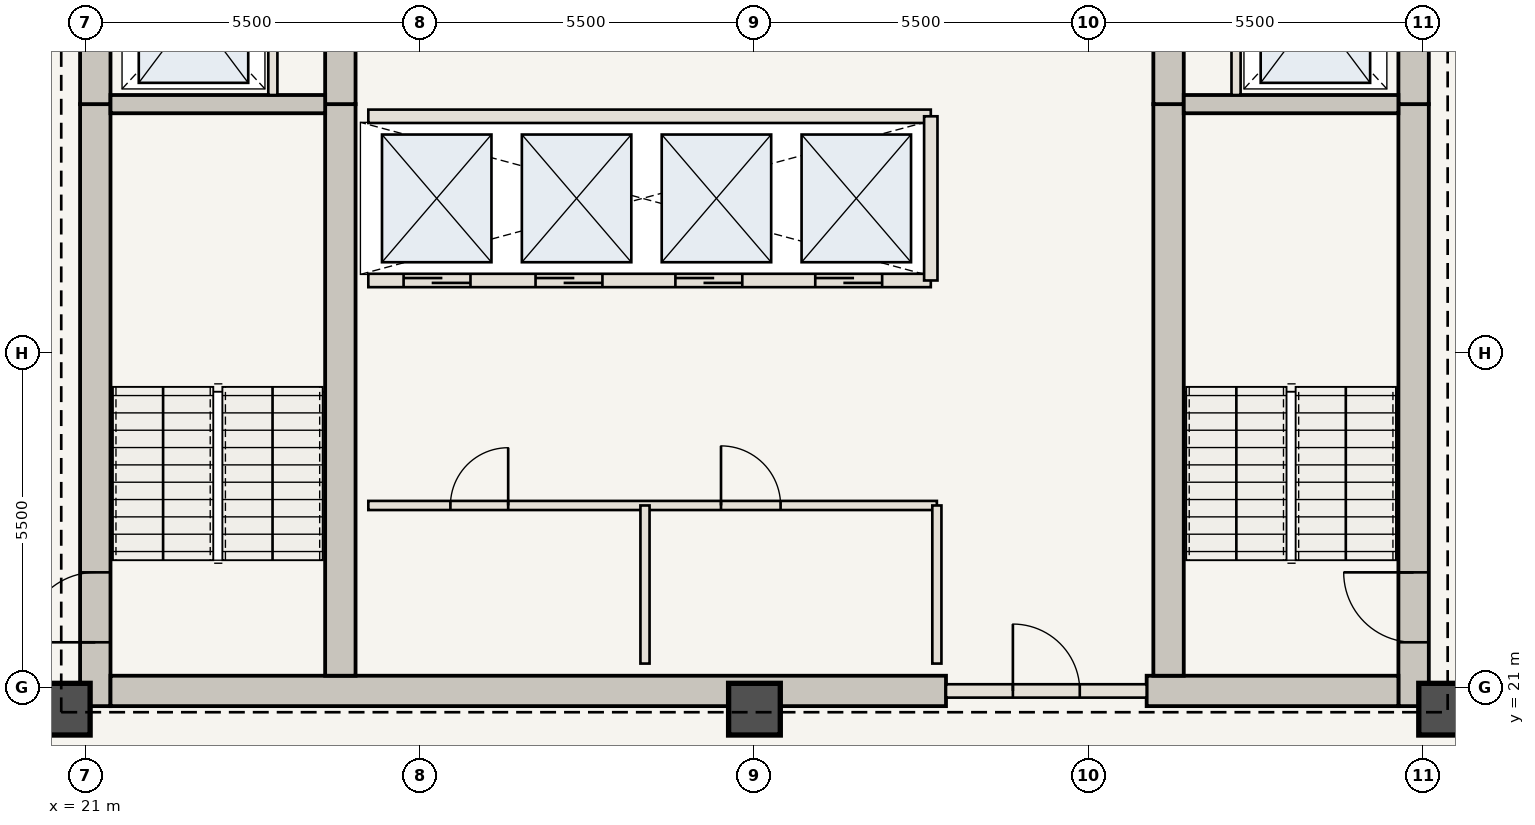
"""IFC4 building model, lengths in metres.
Left out: names, types, materials, properties, quantities, classifications, styles, units other than length and angle.
Written with IfcOpenShell. Run it as: python <this file> out.ifc"""

import sys

from ifc_helpers import new_model, si_unit, direction, frame, frame_2d, origin, origin_2d, place, context, subcontext, project, spatial, rectangle, extrude, element, fill, save


model = new_model("IFC4")
c1 = context("Model", 3, precision=1e-05, world=origin(), true_north=direction((0.0, 1.0)))
c2 = subcontext(c1, "Body", "Model", "MODEL_VIEW")
j1 = project(units=[si_unit("LENGTHUNIT", "METRE"), si_unit("PLANEANGLEUNIT", "RADIAN")], contexts=[c1])
p1 = place(None, origin())
s1 = spatial("IfcSite", under=j1, at=p1, CompositionType="ELEMENT")
p2 = place(p1, origin())
s2 = spatial("IfcBuilding", under=s1, at=p2, CompositionType="ELEMENT")
p3 = place(p2, frame((0.0, 0.0, 186.9)))
s3 = spatial("IfcBuildingStorey", under=s2, at=p3, CompositionType="ELEMENT", Elevation=186.9)
p4 = place(p3, frame((21.16, 20.7, 0.0), z_axis=(0.0, 0.0, 1.0), x_axis=(0.0, 1.0, 0.0)))
e1 = element("IfcWall", 1, at=p4, inside=s3, PredefinedType="SHEAR", context=c2, shape_type="SweptSolid", body=[
    extrude(rectangle(XDim=9.9, YDim=0.5, at=frame_2d((4.95, 0.0))), origin(), (0.0, 0.0, 1.0), 3.85),
])
p5 = place(p4, frame((1.05, 0.0, 0.0)))
e2 = element("IfcOpeningElement", 2, at=p5, cuts=e1, PredefinedType="OPENING", context=c2, shape_type="SweptSolid", body=[
    extrude(rectangle(XDim=1.15, YDim=2.15, at=frame_2d((0.575, 1.075))), frame((0.0, 0.26, 0.0), z_axis=(0.0, -1.0, 0.0), x_axis=(1.0, 0.0, 0.0)), (0.0, 0.0, 1.0), 0.52),
])
p6 = place(p3, frame((21.16, 30.6, 0.0), z_axis=(0.0, 0.0, 1.0), x_axis=(0.0, 1.0, 0.0)))
e3 = element("IfcWall", 3, at=p6, inside=s3, PredefinedType="SHEAR", context=c2, shape_type="SweptSolid", body=[
    extrude(rectangle(XDim=12.65, YDim=0.5, at=frame_2d((6.325, 0.0))), origin(), (0.0, 0.0, 1.0), 3.85),
])
p7 = place(p6, frame((4.2, 0.0, 0.0)))
e4 = element("IfcOpeningElement", 4, at=p7, cuts=e3, PredefinedType="OPENING", context=c2, shape_type="SweptSolid", body=[
    extrude(rectangle(XDim=1.1, YDim=2.15, at=frame_2d((0.55, 1.075))), frame((0.0, 0.26, 0.0), z_axis=(0.0, -1.0, 0.0), x_axis=(1.0, 0.0, 0.0)), (0.0, 0.0, 1.0), 0.52),
])
p8 = place(p6, frame((9.2, 0.0, 0.0)))
e5 = element("IfcOpeningElement", 5, at=p8, cuts=e3, PredefinedType="OPENING", context=c2, shape_type="SweptSolid", body=[
    extrude(rectangle(XDim=0.92, YDim=2.1, at=frame_2d((0.46, 1.05))), frame((0.0, 0.26, 0.0), z_axis=(0.0, -1.0, 0.0), x_axis=(1.0, 0.0, 0.0)), (0.0, 0.0, 1.0), 0.52),
])
p9 = place(p3, frame((42.84, 20.7, 0.0), z_axis=(0.0, 0.0, 1.0), x_axis=(0.0, 1.0, 0.0)))
e6 = element("IfcWall", 6, at=p9, inside=s3, PredefinedType="SHEAR", context=c2, shape_type="SweptSolid", body=[
    extrude(rectangle(XDim=9.9, YDim=0.5, at=frame_2d((4.95, 0.0))), origin(), (0.0, 0.0, 1.0), 3.85),
])
p10 = place(p9, frame((1.05, 0.0, 0.0)))
e7 = element("IfcOpeningElement", 7, at=p10, cuts=e6, PredefinedType="OPENING", context=c2, shape_type="SweptSolid", body=[
    extrude(rectangle(XDim=1.15, YDim=2.15, at=frame_2d((0.575, 1.075))), frame((0.0, 0.26, 0.0), z_axis=(0.0, -1.0, 0.0), x_axis=(1.0, 0.0, 0.0)), (0.0, 0.0, 1.0), 0.52),
])
p11 = place(p3, frame((42.84, 30.6, 0.0), z_axis=(0.0, 0.0, 1.0), x_axis=(0.0, 1.0, 0.0)))
e8 = element("IfcWall", 8, at=p11, inside=s3, PredefinedType="SHEAR", context=c2, shape_type="SweptSolid", body=[
    extrude(rectangle(XDim=12.65, YDim=0.5, at=frame_2d((6.325, 0.0))), origin(), (0.0, 0.0, 1.0), 3.85),
])
p12 = place(p11, frame((4.2, 0.0, 0.0)))
e9 = element("IfcOpeningElement", 9, at=p12, cuts=e8, PredefinedType="OPENING", context=c2, shape_type="SweptSolid", body=[
    extrude(rectangle(XDim=1.1, YDim=2.15, at=frame_2d((0.55, 1.075))), frame((0.0, 0.26, 0.0), z_axis=(0.0, -1.0, 0.0), x_axis=(1.0, 0.0, 0.0)), (0.0, 0.0, 1.0), 0.52),
])
p13 = place(p11, frame((8.4, 0.0, 0.0)))
e10 = element("IfcOpeningElement", 10, at=p13, cuts=e8, PredefinedType="OPENING", context=c2, shape_type="SweptSolid", body=[
    extrude(rectangle(XDim=0.88, YDim=2.1, at=frame_2d((0.44, 1.05))), frame((0.0, 0.26, 0.0), z_axis=(0.0, -1.0, 0.0), x_axis=(1.0, 0.0, 0.0)), (0.0, 0.0, 1.0), 0.52),
])
p14 = place(p11, frame((10.5, 0.0, 0.0)))
e11 = element("IfcOpeningElement", 11, at=p14, cuts=e8, PredefinedType="OPENING", context=c2, shape_type="SweptSolid", body=[
    extrude(rectangle(XDim=0.88, YDim=2.1, at=frame_2d((0.44, 1.05))), frame((0.0, 0.26, 0.0), z_axis=(0.0, -1.0, 0.0), x_axis=(1.0, 0.0, 0.0)), (0.0, 0.0, 1.0), 0.52),
])
p15 = place(p3, frame((21.41, 20.95, 0.0), z_axis=(0.0, 0.0, 1.0), x_axis=(1.0, 0.0, 0.0)))
e12 = element("IfcWall", 12, at=p15, inside=s3, PredefinedType="SHEAR", context=c2, shape_type="SweptSolid", body=[
    extrude(rectangle(XDim=13.74, YDim=0.5, at=frame_2d((6.87, 0.0))), origin(), (0.0, 0.0, 1.0), 3.85),
])
p16 = place(p3, frame((38.45, 20.95, 0.0), z_axis=(0.0, 0.0, 1.0), x_axis=(1.0, 0.0, 0.0)))
e13 = element("IfcWall", 13, at=p16, inside=s3, PredefinedType="SHEAR", context=c2, shape_type="SweptSolid", body=[
    extrude(rectangle(XDim=4.14, YDim=0.5, at=frame_2d((2.07, 0.0))), origin(), (0.0, 0.0, 1.0), 3.85),
])
p17 = place(p3, frame((25.19, 21.2, 0.0), z_axis=(0.0, 0.0, 1.0), x_axis=(0.0, 1.0, 0.0)))
e14 = element("IfcWall", 14, at=p17, inside=s3, PredefinedType="SHEAR", context=c2, shape_type="SweptSolid", body=[
    extrude(rectangle(XDim=9.4, YDim=0.5, at=frame_2d((4.7, 0.0))), origin(), (0.0, 0.0, 1.0), 3.85),
])
p18 = place(p3, frame((25.19, 30.6, 0.0), z_axis=(0.0, 0.0, 1.0), x_axis=(0.0, 1.0, 0.0)))
e15 = element("IfcWall", 15, at=p18, inside=s3, PredefinedType="SHEAR", context=c2, shape_type="SweptSolid", body=[
    extrude(rectangle(XDim=12.15, YDim=0.5, at=frame_2d((6.075, 0.0))), origin(), (0.0, 0.0, 1.0), 3.85),
])
p19 = place(p18, frame((6.25, 0.0, 0.0)))
e16 = element("IfcOpeningElement", 16, at=p19, cuts=e15, PredefinedType="OPENING", context=c2, shape_type="SweptSolid", body=[
    extrude(rectangle(XDim=1.1, YDim=2.15, at=frame_2d((0.55, 1.075))), frame((0.0, 0.26, 0.0), z_axis=(0.0, -1.0, 0.0), x_axis=(1.0, 0.0, 0.0)), (0.0, 0.0, 1.0), 0.52),
])
p20 = place(p3, frame((38.81, 21.2, 0.0), z_axis=(0.0, 0.0, 1.0), x_axis=(0.0, 1.0, 0.0)))
e17 = element("IfcWall", 17, at=p20, inside=s3, PredefinedType="SHEAR", context=c2, shape_type="SweptSolid", body=[
    extrude(rectangle(XDim=9.4, YDim=0.5, at=frame_2d((4.7, 0.0))), origin(), (0.0, 0.0, 1.0), 3.85),
])
p21 = place(p3, frame((38.81, 30.6, 0.0), z_axis=(0.0, 0.0, 1.0), x_axis=(0.0, 1.0, 0.0)))
e18 = element("IfcWall", 18, at=p21, inside=s3, PredefinedType="SHEAR", context=c2, shape_type="SweptSolid", body=[
    extrude(rectangle(XDim=12.15, YDim=0.5, at=frame_2d((6.075, 0.0))), origin(), (0.0, 0.0, 1.0), 3.85),
])
for number, where, z_axis, x_axis in (
    (19, (20.65, 20.65, 0.0), (0.0, 0.0, 1.0), (1.0, 0.0, 0.0)),
    (20, (32.0, 20.65, 0.0), (0.0, 0.0, 1.0), (1.0, 0.0, 0.0)),
    (21, (43.35, 20.65, 0.0), (0.0, 0.0, 1.0), (1.0, 0.0, 0.0)),
):
    element("IfcColumn", number, at=place(p3, frame(where, z_axis=z_axis, x_axis=x_axis)), inside=s3, PredefinedType="COLUMN", context=c2, shape_type="SweptSolid", body=[
        extrude(rectangle(XDim=0.85, YDim=0.85, at=origin_2d()), origin(), (0.0, 0.0, 1.0), 3.85),
    ])
for number, where, z_axis, x_axis in (
    (22, (21.41, 30.6, 0.0), (0.0, 0.0, 1.0), (1.0, 0.0, 0.0)),
    (23, (39.06, 30.6, 0.0), (0.0, 0.0, 1.0), (1.0, 0.0, 0.0)),
):
    element("IfcWall", number, at=place(p3, frame(where, z_axis=z_axis, x_axis=x_axis)), inside=s3, PredefinedType="SHEAR", context=c2, shape_type="SweptSolid", body=[
        extrude(rectangle(XDim=3.53, YDim=0.3, at=frame_2d((1.765, 0.0))), origin(), (0.0, 0.0, 1.0), 3.43),
    ])
for number, where, z_axis, x_axis in (
    (24, (24.08, 30.75, 0.0), (0.0, 0.0, 1.0), (0.0, 1.0, 0.0)),
    (25, (39.92, 30.75, 0.0), (0.0, 0.0, 1.0), (0.0, 1.0, 0.0)),
):
    element("IfcWall", number, at=place(p3, frame(where, z_axis=z_axis, x_axis=x_axis)), inside=s3, PredefinedType="STANDARD", context=c2, shape_type="SweptSolid", body=[
        extrude(rectangle(XDim=2.65, YDim=0.15, at=frame_2d((1.325, 0.0))), origin(), (0.0, 0.0, 1.0), 3.43),
    ])
p22 = place(p3, frame((35.15, 20.95, 0.0), z_axis=(0.0, 0.0, 1.0), x_axis=(1.0, 0.0, 0.0)))
e26 = element("IfcWall", 26, at=p22, inside=s3, PredefinedType="STANDARD", context=c2, shape_type="SweptSolid", body=[
    extrude(rectangle(XDim=3.3, YDim=0.22, at=frame_2d((1.65, 0.0))), origin(), (0.0, 0.0, 1.0), 3.43),
])
p23 = place(p22, frame((1.1, 0.0, 0.0)))
e27 = element("IfcOpeningElement", 27, at=p23, cuts=e26, PredefinedType="OPENING", context=c2, shape_type="SweptSolid", body=[
    extrude(rectangle(XDim=1.1, YDim=2.15, at=frame_2d((0.55, 1.075))), frame((0.0, 0.12, 0.0), z_axis=(0.0, -1.0, 0.0), x_axis=(1.0, 0.0, 0.0)), (0.0, 0.0, 1.0), 0.24),
])
p24 = place(p3, frame((25.65, 24.0, 0.0), z_axis=(0.0, 0.0, 1.0), x_axis=(1.0, 0.0, 0.0)))
e28 = element("IfcWall", 28, at=p24, inside=s3, PredefinedType="STANDARD", context=c2, shape_type="SweptSolid", body=[
    extrude(rectangle(XDim=9.35, YDim=0.15, at=frame_2d((4.675, 0.0))), origin(), (0.0, 0.0, 1.0), 3.43),
])
p25 = place(p24, frame((1.35, 0.0, 0.0)))
e29 = element("IfcOpeningElement", 29, at=p25, cuts=e28, PredefinedType="OPENING", context=c2, shape_type="SweptSolid", body=[
    extrude(rectangle(XDim=0.95, YDim=2.15, at=frame_2d((0.475, 1.075))), frame((0.0, 0.085, 0.0), z_axis=(0.0, -1.0, 0.0), x_axis=(1.0, 0.0, 0.0)), (0.0, 0.0, 1.0), 0.17),
])
p26 = place(p24, frame((5.8, 0.0, 0.0)))
e30 = element("IfcOpeningElement", 30, at=p26, cuts=e28, PredefinedType="OPENING", context=c2, shape_type="SweptSolid", body=[
    extrude(rectangle(XDim=0.98, YDim=2.2, at=frame_2d((0.49, 1.1))), frame((0.0, 0.085, 0.0), z_axis=(0.0, -1.0, 0.0), x_axis=(1.0, 0.0, 0.0)), (0.0, 0.0, 1.0), 0.17),
])
for number, where, z_axis, x_axis in (
    (31, (30.2, 21.4, 0.0), (0.0, 0.0, 1.0), (0.0, 1.0, 0.0)),
    (32, (35.0, 21.4, 0.0), (0.0, 0.0, 1.0), (0.0, 1.0, 0.0)),
):
    element("IfcWall", number, at=place(p3, frame(where, z_axis=z_axis, x_axis=x_axis)), inside=s3, PredefinedType="STANDARD", context=c2, shape_type="SweptSolid", body=[
        extrude(rectangle(XDim=2.6, YDim=0.15, at=frame_2d((1.3, 0.0))), origin(), (0.0, 0.0, 1.0), 3.43),
    ])
p27 = place(p3, frame((25.65, 27.7, 0.0), z_axis=(0.0, 0.0, 1.0), x_axis=(1.0, 0.0, 0.0)))
e33 = element("IfcWall", 33, at=p27, inside=s3, PredefinedType="STANDARD", context=c2, shape_type="SweptSolid", body=[
    extrude(rectangle(XDim=9.25, YDim=0.22, at=frame_2d((4.625, 0.0))), origin(), (0.0, 0.0, 1.0), 3.43),
])
p28 = place(p27, frame((0.58, 0.0, 0.0)))
e34 = element("IfcOpeningElement", 34, at=p28, cuts=e33, PredefinedType="OPENING", context=c2, shape_type="SweptSolid", body=[
    extrude(rectangle(XDim=1.1, YDim=2.15, at=frame_2d((0.55, 1.075))), frame((0.0, 0.12, 0.0), z_axis=(0.0, -1.0, 0.0), x_axis=(1.0, 0.0, 0.0)), (0.0, 0.0, 1.0), 0.24),
])
p29 = place(p27, frame((2.75, 0.0, 0.0)))
e35 = element("IfcOpeningElement", 35, at=p29, cuts=e33, PredefinedType="OPENING", context=c2, shape_type="SweptSolid", body=[
    extrude(rectangle(XDim=1.1, YDim=2.15, at=frame_2d((0.55, 1.075))), frame((0.0, 0.12, 0.0), z_axis=(0.0, -1.0, 0.0), x_axis=(1.0, 0.0, 0.0)), (0.0, 0.0, 1.0), 0.24),
])
p30 = place(p27, frame((5.05, 0.0, 0.0)))
e36 = element("IfcOpeningElement", 36, at=p30, cuts=e33, PredefinedType="OPENING", context=c2, shape_type="SweptSolid", body=[
    extrude(rectangle(XDim=1.1, YDim=2.15, at=frame_2d((0.55, 1.075))), frame((0.0, 0.12, 0.0), z_axis=(0.0, -1.0, 0.0), x_axis=(1.0, 0.0, 0.0)), (0.0, 0.0, 1.0), 0.24),
])
p31 = place(p27, frame((7.35, 0.0, 0.0)))
e37 = element("IfcOpeningElement", 37, at=p31, cuts=e33, PredefinedType="OPENING", context=c2, shape_type="SweptSolid", body=[
    extrude(rectangle(XDim=1.1, YDim=2.15, at=frame_2d((0.55, 1.075))), frame((0.0, 0.12, 0.0), z_axis=(0.0, -1.0, 0.0), x_axis=(1.0, 0.0, 0.0)), (0.0, 0.0, 1.0), 0.24),
])
p32 = place(p3, frame((25.65, 30.4, 0.0), z_axis=(0.0, 0.0, 1.0), x_axis=(1.0, 0.0, 0.0)))
e38 = element("IfcWall", 38, at=p32, inside=s3, PredefinedType="STANDARD", context=c2, shape_type="SweptSolid", body=[
    extrude(rectangle(XDim=9.25, YDim=0.22, at=frame_2d((4.625, 0.0))), origin(), (0.0, 0.0, 1.0), 3.43),
])
p33 = place(p3, frame((34.9, 27.7, 0.0), z_axis=(0.0, 0.0, 1.0), x_axis=(0.0, 1.0, 0.0)))
e39 = element("IfcWall", 39, at=p33, inside=s3, PredefinedType="STANDARD", context=c2, shape_type="SweptSolid", body=[
    extrude(rectangle(XDim=2.7, YDim=0.22, at=frame_2d((1.35, 0.0))), origin(), (0.0, 0.0, 1.0), 3.43),
])
p34 = place(p5, origin())
e40 = element("IfcDoor", 40, at=p34, inside=s3, OperationType="SINGLE_SWING_LEFT", PredefinedType="DOOR", context=c2, shape_type="SweptSolid", body=[
    extrude(rectangle(XDim=1.15, YDim=2.15, at=frame_2d((0.575, 1.075))), frame((0.0, 0.025, 0.0), z_axis=(0.0, -1.0, 0.0), x_axis=(1.0, 0.0, 0.0)), (0.0, 0.0, 1.0), 0.05),
])
fill(e2, e40)
p35 = place(p10, origin())
e41 = element("IfcDoor", 41, at=p35, inside=s3, OperationType="SINGLE_SWING_RIGHT", PredefinedType="DOOR", context=c2, shape_type="SweptSolid", body=[
    extrude(rectangle(XDim=1.15, YDim=2.15, at=frame_2d((0.575, 1.075))), frame((0.0, 0.025, 0.0), z_axis=(0.0, -1.0, 0.0), x_axis=(1.0, 0.0, 0.0)), (0.0, 0.0, 1.0), 0.05),
])
fill(e7, e41)
p36 = place(p23, origin())
e42 = element("IfcDoor", 42, at=p36, inside=s3, OperationType="SINGLE_SWING_LEFT", PredefinedType="DOOR", context=c2, shape_type="SweptSolid", body=[
    extrude(rectangle(XDim=1.1, YDim=2.15, at=frame_2d((0.55, 1.075))), frame((0.0, 0.025, 0.0), z_axis=(0.0, -1.0, 0.0), x_axis=(1.0, 0.0, 0.0)), (0.0, 0.0, 1.0), 0.05),
])
fill(e27, e42)
p37 = place(p25, origin())
e43 = element("IfcDoor", 43, at=p37, inside=s3, OperationType="SINGLE_SWING_RIGHT", PredefinedType="DOOR", context=c2, shape_type="SweptSolid", body=[
    extrude(rectangle(XDim=0.95, YDim=2.15, at=frame_2d((0.475, 1.075))), frame((0.0, 0.025, 0.0), z_axis=(0.0, -1.0, 0.0), x_axis=(1.0, 0.0, 0.0)), (0.0, 0.0, 1.0), 0.05),
])
fill(e29, e43)
p38 = place(p26, origin())
e44 = element("IfcDoor", 44, at=p38, inside=s3, OperationType="SINGLE_SWING_LEFT", PredefinedType="DOOR", context=c2, shape_type="SweptSolid", body=[
    extrude(rectangle(XDim=0.98, YDim=2.2, at=frame_2d((0.49, 1.1))), frame((0.0, 0.025, 0.0), z_axis=(0.0, -1.0, 0.0), x_axis=(1.0, 0.0, 0.0)), (0.0, 0.0, 1.0), 0.05),
])
fill(e30, e44)
p39 = place(p28, origin())
e45 = element("IfcDoor", 45, at=p39, inside=s3, OperationType="DOUBLE_DOOR_SLIDING", PredefinedType="DOOR", context=c2, shape_type="SweptSolid", body=[
    extrude(rectangle(XDim=1.1, YDim=2.15, at=frame_2d((0.55, 1.075))), frame((0.0, 0.025, 0.0), z_axis=(0.0, -1.0, 0.0), x_axis=(1.0, 0.0, 0.0)), (0.0, 0.0, 1.0), 0.05),
])
fill(e34, e45)
p40 = place(p29, origin())
e46 = element("IfcDoor", 46, at=p40, inside=s3, OperationType="DOUBLE_DOOR_SLIDING", PredefinedType="DOOR", context=c2, shape_type="SweptSolid", body=[
    extrude(rectangle(XDim=1.1, YDim=2.15, at=frame_2d((0.55, 1.075))), frame((0.0, 0.025, 0.0), z_axis=(0.0, -1.0, 0.0), x_axis=(1.0, 0.0, 0.0)), (0.0, 0.0, 1.0), 0.05),
])
fill(e35, e46)
p41 = place(p30, origin())
e47 = element("IfcDoor", 47, at=p41, inside=s3, OperationType="DOUBLE_DOOR_SLIDING", PredefinedType="DOOR", context=c2, shape_type="SweptSolid", body=[
    extrude(rectangle(XDim=1.1, YDim=2.15, at=frame_2d((0.55, 1.075))), frame((0.0, 0.025, 0.0), z_axis=(0.0, -1.0, 0.0), x_axis=(1.0, 0.0, 0.0)), (0.0, 0.0, 1.0), 0.05),
])
fill(e36, e47)
p42 = place(p31, origin())
e48 = element("IfcDoor", 48, at=p42, inside=s3, OperationType="DOUBLE_DOOR_SLIDING", PredefinedType="DOOR", context=c2, shape_type="SweptSolid", body=[
    extrude(rectangle(XDim=1.1, YDim=2.15, at=frame_2d((0.55, 1.075))), frame((0.0, 0.025, 0.0), z_axis=(0.0, -1.0, 0.0), x_axis=(1.0, 0.0, 0.0)), (0.0, 0.0, 1.0), 0.05),
])
fill(e37, e48)
save(model, sys.argv[1])
